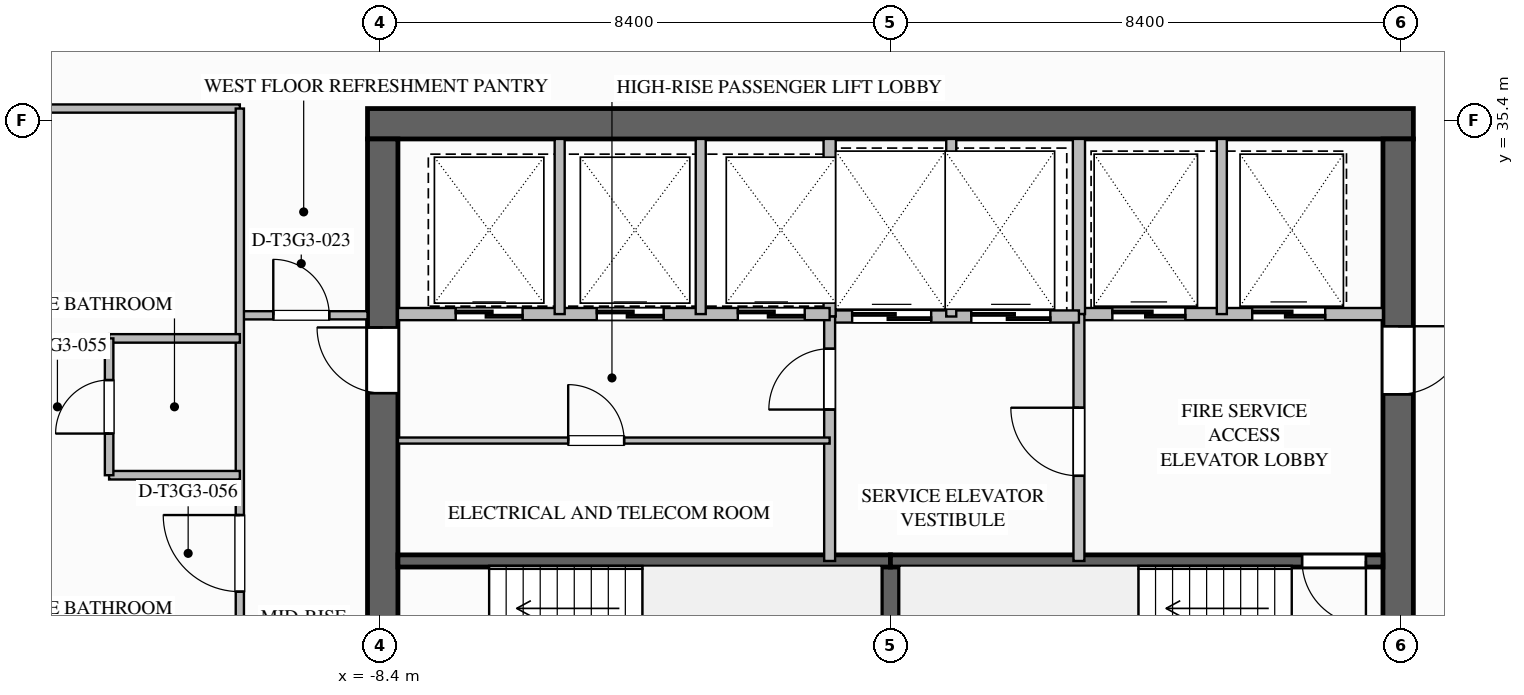
"""IFC4 building model, lengths in metres.
Left out: names, types, materials, properties, quantities, classifications, styles, units other than length and angle.
Written with IfcOpenShell. Run it as: python <this file> out.ifc"""

import sys

from ifc_helpers import new_model, si_unit, direction, frame, frame_2d, origin, place, context, subcontext, project, spatial, rectangle, extrude, element, fill, save


model = new_model("IFC4")
c1 = context("Model", 3, precision=1e-05, world=origin(), true_north=direction((0.0, 1.0)))
c2 = subcontext(c1, "Body", "Model", "MODEL_VIEW")
j1 = project(units=[si_unit("LENGTHUNIT", "METRE"), si_unit("PLANEANGLEUNIT", "RADIAN")], contexts=[c1])
p1 = place(None, origin())
s1 = spatial("IfcSite", under=j1, at=p1, CompositionType="ELEMENT")
p2 = place(p1, origin())
s2 = spatial("IfcBuilding", under=s1, at=p2, CompositionType="ELEMENT")
p3 = place(p2, frame((0.0, 0.0, 171.7)))
s3 = spatial("IfcBuildingStorey", under=s2, at=p3, CompositionType="ELEMENT", Elevation=171.7)
p4 = place(p3, frame((-8.6, 35.35, 0.0), z_axis=(0.0, 0.0, 1.0), x_axis=(1.0, 0.0, 0.0)))
e1 = element("IfcWall", 1, at=p4, inside=s3, PredefinedType="SHEAR", context=c2, shape_type="SweptSolid", body=[
    extrude(rectangle(XDim=17.2, YDim=0.5, at=frame_2d((8.6, 0.0))), origin(), (0.0, 0.0, 1.0), 3.55),
])
p5 = place(p3, frame((8.35, 35.1, 0.0), z_axis=(0.0, 0.0, 1.0), x_axis=(0.0, -1.0, 0.0)))
e2 = element("IfcWall", 2, at=p5, inside=s3, PredefinedType="SHEAR", context=c2, shape_type="SweptSolid", body=[
    extrude(rectangle(XDim=16.2, YDim=0.5, at=frame_2d((8.1, 0.0))), origin(), (0.0, 0.0, 1.0), 3.55),
])
p6 = place(p5, frame((3.08, 0.0, 0.0)))
e3 = element("IfcOpeningElement", 3, at=p6, cuts=e2, PredefinedType="OPENING", context=c2, shape_type="SweptSolid", body=[
    extrude(rectangle(XDim=1.12, YDim=2.1, at=frame_2d((0.56, 1.05))), frame((0.0, 0.26, 0.0), z_axis=(0.0, -1.0, 0.0), x_axis=(1.0, 0.0, 0.0)), (0.0, 0.0, 1.0), 0.52),
])
p7 = place(p5, frame((10.62, 0.0, 0.0)))
e4 = element("IfcOpeningElement", 4, at=p7, cuts=e2, PredefinedType="OPENING", context=c2, shape_type="SweptSolid", body=[
    extrude(rectangle(XDim=1.08, YDim=2.04, at=frame_2d((0.54, 1.02))), frame((0.0, 0.26, 0.0), z_axis=(0.0, -1.0, 0.0), x_axis=(1.0, 0.0, 0.0)), (0.0, 0.0, 1.0), 0.52),
])
p8 = place(p3, frame((-8.35, 18.9, 0.0), z_axis=(0.0, 0.0, 1.0), x_axis=(0.0, 1.0, 0.0)))
e5 = element("IfcWall", 5, at=p8, inside=s3, PredefinedType="SHEAR", context=c2, shape_type="SweptSolid", body=[
    extrude(rectangle(XDim=16.2, YDim=0.5, at=frame_2d((8.1, 0.0))), origin(), (0.0, 0.0, 1.0), 3.55),
])
p9 = place(p8, frame((12.02, 0.0, 0.0)))
e6 = element("IfcOpeningElement", 6, at=p9, cuts=e5, PredefinedType="OPENING", context=c2, shape_type="SweptSolid", body=[
    extrude(rectangle(XDim=1.08, YDim=2.04, at=frame_2d((0.54, 1.02))), frame((0.0, 0.26, 0.0), z_axis=(0.0, -1.0, 0.0), x_axis=(1.0, 0.0, 0.0)), (0.0, 0.0, 1.0), 0.52),
])
p10 = place(p8, frame((4.5, 0.0, 0.0)))
e7 = element("IfcOpeningElement", 7, at=p10, cuts=e5, PredefinedType="OPENING", context=c2, shape_type="SweptSolid", body=[
    extrude(rectangle(XDim=1.08, YDim=2.04, at=frame_2d((0.54, 1.02))), frame((0.0, 0.26, 0.0), z_axis=(0.0, -1.0, 0.0), x_axis=(1.0, 0.0, 0.0)), (0.0, 0.0, 1.0), 0.52),
])
p11 = place(p3, frame((0.0, 25.04, 0.0), z_axis=(0.0, 0.0, 1.0), x_axis=(0.0, 1.0, 0.0)))
e8 = element("IfcWall", 8, at=p11, inside=s3, PredefinedType="SOLIDWALL", context=c2, shape_type="SweptSolid", body=[
    extrude(rectangle(XDim=3.12, YDim=0.3, at=frame_2d((1.56, 0.0))), origin(), (0.0, 0.0, 1.0), 3.29),
])
p12 = place(p3, frame((-8.1, 28.16, 0.0), z_axis=(0.0, 0.0, 1.0), x_axis=(1.0, 0.0, 0.0)))
e9 = element("IfcWall", 9, at=p12, inside=s3, PredefinedType="SOLIDWALL", context=c2, shape_type="SweptSolid", body=[
    extrude(rectangle(XDim=8.1, YDim=0.2, at=frame_2d((4.05, 0.0))), origin(), (0.0, 0.0, 1.0), 3.29),
])
p13 = place(p3, frame((8.1, 28.16, 0.0), z_axis=(0.0, 0.0, 1.0), x_axis=(-1.0, 0.0, 0.0)))
e10 = element("IfcWall", 10, at=p13, inside=s3, PredefinedType="SOLIDWALL", context=c2, shape_type="SweptSolid", body=[
    extrude(rectangle(XDim=8.1, YDim=0.2, at=frame_2d((4.05, 0.0))), origin(), (0.0, 0.0, 1.0), 3.29),
])
p14 = place(p13, frame((0.28, 0.0, 0.0)))
e11 = element("IfcOpeningElement", 11, at=p14, cuts=e10, PredefinedType="OPENING", context=c2, shape_type="SweptSolid", body=[
    extrude(rectangle(XDim=1.05, YDim=2.1, at=frame_2d((0.525, 1.05))), frame((0.0, 0.11, 0.0), z_axis=(0.0, -1.0, 0.0), x_axis=(1.0, 0.0, 0.0)), (0.0, 0.0, 1.0), 0.22),
])
p15 = place(p3, frame((3.1, 32.22, 0.0), z_axis=(0.0, 0.0, 1.0), x_axis=(1.0, 0.0, 0.0)))
e12 = element("IfcWall", 12, at=p15, inside=s3, PredefinedType="SOLIDWALL", context=c2, shape_type="SweptSolid", body=[
    extrude(rectangle(XDim=5.0, YDim=0.2, at=frame_2d((2.5, 0.0))), origin(), (0.0, 0.0, 1.0), 3.29),
])
p16 = place(p15, frame((0.55, 0.0, 0.0)))
e13 = element("IfcOpeningElement", 13, at=p16, cuts=e12, PredefinedType="OPENING", context=c2, shape_type="SweptSolid", body=[
    extrude(rectangle(XDim=1.2, YDim=2.2, at=frame_2d((0.6, 1.1))), frame((0.0, 0.11, 0.0), z_axis=(0.0, -1.0, 0.0), x_axis=(1.0, 0.0, 0.0)), (0.0, 0.0, 1.0), 0.22),
])
p17 = place(p15, frame((2.85, 0.0, 0.0)))
e14 = element("IfcOpeningElement", 14, at=p17, cuts=e12, PredefinedType="OPENING", context=c2, shape_type="SweptSolid", body=[
    extrude(rectangle(XDim=1.2, YDim=2.2, at=frame_2d((0.6, 1.1))), frame((0.0, 0.11, 0.0), z_axis=(0.0, -1.0, 0.0), x_axis=(1.0, 0.0, 0.0)), (0.0, 0.0, 1.0), 0.22),
])
p18 = place(p3, frame((3.1, 32.22, 0.0), z_axis=(0.0, 0.0, 1.0), x_axis=(0.0, 1.0, 0.0)))
e15 = element("IfcWall", 15, at=p18, inside=s3, PredefinedType="SOLIDWALL", context=c2, shape_type="SweptSolid", body=[
    extrude(rectangle(XDim=2.88, YDim=0.2, at=frame_2d((1.44, 0.0))), origin(), (0.0, 0.0, 1.0), 3.29),
])
p19 = place(p3, frame((5.45, 32.22, 0.0), z_axis=(0.0, 0.0, 1.0), x_axis=(0.0, 1.0, 0.0)))
e16 = element("IfcWall", 16, at=p19, inside=s3, PredefinedType="PARTITIONING", context=c2, shape_type="SweptSolid", body=[
    extrude(rectangle(XDim=2.88, YDim=0.165, at=frame_2d((1.44, 0.0))), origin(), (0.0, 0.0, 1.0), 3.29),
])
p20 = place(p3, frame((3.1, 28.16, 0.0), z_axis=(0.0, 0.0, 1.0), x_axis=(0.0, 1.0, 0.0)))
e17 = element("IfcWall", 17, at=p20, inside=s3, PredefinedType="SOLIDWALL", context=c2, shape_type="SweptSolid", body=[
    extrude(rectangle(XDim=4.06, YDim=0.18, at=frame_2d((2.03, 0.0))), origin(), (0.0, 0.0, 1.0), 3.29),
])
p21 = place(p20, frame((1.4, 0.0, 0.0)))
e18 = element("IfcOpeningElement", 18, at=p21, cuts=e17, PredefinedType="OPENING", context=c2, shape_type="SweptSolid", body=[
    extrude(rectangle(XDim=1.12, YDim=2.1, at=frame_2d((0.56, 1.05))), frame((0.0, 0.1, 0.0), z_axis=(0.0, -1.0, 0.0), x_axis=(1.0, 0.0, 0.0)), (0.0, 0.0, 1.0), 0.2),
])
p22 = place(p3, frame((-1.0, 32.18, 0.0), z_axis=(0.0, 0.0, 1.0), x_axis=(1.0, 0.0, 0.0)))
e19 = element("IfcWall", 19, at=p22, inside=s3, PredefinedType="SOLIDWALL", context=c2, shape_type="SweptSolid", body=[
    extrude(rectangle(XDim=4.1, YDim=0.2, at=frame_2d((2.05, 0.0))), origin(), (0.0, 0.0, 1.0), 3.29),
])
p23 = place(p22, frame((0.37, 0.0, 0.0)))
e20 = element("IfcOpeningElement", 20, at=p23, cuts=e19, PredefinedType="OPENING", context=c2, shape_type="SweptSolid", body=[
    extrude(rectangle(XDim=1.3, YDim=2.2, at=frame_2d((0.65, 1.1))), frame((0.0, 0.11, 0.0), z_axis=(0.0, -1.0, 0.0), x_axis=(1.0, 0.0, 0.0)), (0.0, 0.0, 1.0), 0.22),
])
p24 = place(p22, frame((2.33, 0.0, 0.0)))
e21 = element("IfcOpeningElement", 21, at=p24, cuts=e19, PredefinedType="OPENING", context=c2, shape_type="SweptSolid", body=[
    extrude(rectangle(XDim=1.3, YDim=2.2, at=frame_2d((0.65, 1.1))), frame((0.0, 0.11, 0.0), z_axis=(0.0, -1.0, 0.0), x_axis=(1.0, 0.0, 0.0)), (0.0, 0.0, 1.0), 0.22),
])
p25 = place(p3, frame((-1.0, 32.18, 0.0), z_axis=(0.0, 0.0, 1.0), x_axis=(0.0, 1.0, 0.0)))
e22 = element("IfcWall", 22, at=p25, inside=s3, PredefinedType="SOLIDWALL", context=c2, shape_type="SweptSolid", body=[
    extrude(rectangle(XDim=2.92, YDim=0.2, at=frame_2d((1.46, 0.0))), origin(), (0.0, 0.0, 1.0), 3.29),
])
p26 = place(p3, frame((1.0, 32.18, 0.0), z_axis=(0.0, 0.0, 1.0), x_axis=(0.0, 1.0, 0.0)))
e23 = element("IfcWall", 23, at=p26, inside=s3, PredefinedType="PARTITIONING", context=c2, shape_type="SweptSolid", body=[
    extrude(rectangle(XDim=2.92, YDim=0.165, at=frame_2d((1.46, 0.0))), origin(), (0.0, 0.0, 1.0), 3.29),
])
p27 = place(p3, frame((-1.0, 28.16, 0.0), z_axis=(0.0, 0.0, 1.0), x_axis=(0.0, 1.0, 0.0)))
e24 = element("IfcWall", 24, at=p27, inside=s3, PredefinedType="SOLIDWALL", context=c2, shape_type="SweptSolid", body=[
    extrude(rectangle(XDim=4.02, YDim=0.18, at=frame_2d((2.01, 0.0))), origin(), (0.0, 0.0, 1.0), 3.29),
])
p28 = place(p27, frame((2.49, 0.0, 0.0)))
e25 = element("IfcOpeningElement", 25, at=p28, cuts=e24, PredefinedType="OPENING", context=c2, shape_type="SweptSolid", body=[
    extrude(rectangle(XDim=1.0, YDim=2.1, at=frame_2d((0.5, 1.05))), frame((0.0, 0.1, 0.0), z_axis=(0.0, -1.0, 0.0), x_axis=(1.0, 0.0, 0.0)), (0.0, 0.0, 1.0), 0.2),
])
p29 = place(p3, frame((-8.1, 32.22, 0.0), z_axis=(0.0, 0.0, 1.0), x_axis=(1.0, 0.0, 0.0)))
e26 = element("IfcWall", 26, at=p29, inside=s3, PredefinedType="SOLIDWALL", context=c2, shape_type="SweptSolid", body=[
    extrude(rectangle(XDim=7.1, YDim=0.2, at=frame_2d((3.55, 0.0))), origin(), (0.0, 0.0, 1.0), 3.29),
])
p30 = place(p29, frame((0.95, 0.0, 0.0)))
e27 = element("IfcOpeningElement", 27, at=p30, cuts=e26, PredefinedType="OPENING", context=c2, shape_type="SweptSolid", body=[
    extrude(rectangle(XDim=1.1, YDim=2.2, at=frame_2d((0.55, 1.1))), frame((0.0, 0.11, 0.0), z_axis=(0.0, -1.0, 0.0), x_axis=(1.0, 0.0, 0.0)), (0.0, 0.0, 1.0), 0.22),
])
p31 = place(p29, frame((3.27, 0.0, 0.0)))
e28 = element("IfcOpeningElement", 28, at=p31, cuts=e26, PredefinedType="OPENING", context=c2, shape_type="SweptSolid", body=[
    extrude(rectangle(XDim=1.1, YDim=2.2, at=frame_2d((0.55, 1.1))), frame((0.0, 0.11, 0.0), z_axis=(0.0, -1.0, 0.0), x_axis=(1.0, 0.0, 0.0)), (0.0, 0.0, 1.0), 0.22),
])
p32 = place(p29, frame((5.59, 0.0, 0.0)))
e29 = element("IfcOpeningElement", 29, at=p32, cuts=e26, PredefinedType="OPENING", context=c2, shape_type="SweptSolid", body=[
    extrude(rectangle(XDim=1.1, YDim=2.2, at=frame_2d((0.55, 1.1))), frame((0.0, 0.11, 0.0), z_axis=(0.0, -1.0, 0.0), x_axis=(1.0, 0.0, 0.0)), (0.0, 0.0, 1.0), 0.22),
])
for number, where, z_axis, x_axis in (
    (30, (-5.44, 32.22, 0.0), (0.0, 0.0, 1.0), (0.0, 1.0, 0.0)),
    (31, (-3.12, 32.22, 0.0), (0.0, 0.0, 1.0), (0.0, 1.0, 0.0)),
):
    element("IfcWall", number, at=place(p3, frame(where, z_axis=z_axis, x_axis=x_axis)), inside=s3, PredefinedType="PARTITIONING", context=c2, shape_type="SweptSolid", body=[
        extrude(rectangle(XDim=2.88, YDim=0.165, at=frame_2d((1.44, 0.0))), origin(), (0.0, 0.0, 1.0), 3.29),
    ])
p33 = place(p3, frame((-8.1, 30.14, 0.0), z_axis=(0.0, 0.0, 1.0), x_axis=(1.0, 0.0, 0.0)))
e32 = element("IfcWall", 32, at=p33, inside=s3, PredefinedType="PARTITIONING", context=c2, shape_type="SweptSolid", body=[
    extrude(rectangle(XDim=7.1, YDim=0.1, at=frame_2d((3.55, 0.0))), origin(), (0.0, 0.0, 1.0), 3.29),
])
p34 = place(p33, frame((2.8, 0.0, 0.0)))
e33 = element("IfcOpeningElement", 33, at=p34, cuts=e32, PredefinedType="OPENING", context=c2, shape_type="SweptSolid", body=[
    extrude(rectangle(XDim=0.92, YDim=2.1, at=frame_2d((0.46, 1.05))), frame((0.0, 0.06, 0.0), z_axis=(0.0, -1.0, 0.0), x_axis=(1.0, 0.0, 0.0)), (0.0, 0.0, 1.0), 0.12),
])
p35 = place(p3, frame((-10.7, 32.2, 0.0), z_axis=(0.0, 0.0, 1.0), x_axis=(1.0, 0.0, 0.0)))
e34 = element("IfcWall", 34, at=p35, inside=s3, PredefinedType="PARTITIONING", context=c2, shape_type="SweptSolid", body=[
    extrude(rectangle(XDim=2.1, YDim=0.135, at=frame_2d((1.05, 0.0))), origin(), (0.0, 0.0, 1.0), 3.29),
])
p36 = place(p35, frame((0.55, 0.0, 0.0)))
e35 = element("IfcOpeningElement", 35, at=p36, cuts=e34, PredefinedType="OPENING", context=c2, shape_type="SweptSolid", body=[
    extrude(rectangle(XDim=0.92, YDim=2.1, at=frame_2d((0.46, 1.05))), frame((0.0, 0.077, 0.0), z_axis=(0.0, -1.0, 0.0), x_axis=(1.0, 0.0, 0.0)), (0.0, 0.0, 1.0), 0.155),
])
p37 = place(p3, frame((-16.2, 35.6, 0.0), z_axis=(0.0, 0.0, 1.0), x_axis=(1.0, 0.0, 0.0)))
e36 = element("IfcWall", 36, at=p37, inside=s3, PredefinedType="PARTITIONING", context=c2, shape_type="SweptSolid", body=[
    extrude(rectangle(XDim=5.5, YDim=0.135, at=frame_2d((2.75, 0.0))), origin(), (0.0, 0.0, 1.0), 2.667),
])
p38 = place(p3, frame((-10.7, 18.4, 0.0), z_axis=(0.0, 0.0, 1.0), x_axis=(0.0, 1.0, 0.0)))
e37 = element("IfcWall", 37, at=p38, inside=s3, PredefinedType="PARTITIONING", context=c2, shape_type="SweptSolid", body=[
    extrude(rectangle(XDim=17.2, YDim=0.135, at=frame_2d((8.6, 0.0))), origin(), (0.0, 0.0, 1.0), 3.29),
])
p39 = place(p38, frame((4.255, 0.0, 0.0)))
e38 = element("IfcOpeningElement", 38, at=p39, cuts=e37, PredefinedType="OPENING", context=c2, shape_type="SweptSolid", body=[
    extrude(rectangle(XDim=1.26, YDim=2.2, at=frame_2d((0.63, 1.1))), frame((0.0, 0.077, 0.0), z_axis=(0.0, -1.0, 0.0), x_axis=(1.0, 0.0, 0.0)), (0.0, 0.0, 1.0), 0.155),
])
p40 = place(p38, frame((9.255, 0.0, 0.0)))
e39 = element("IfcOpeningElement", 39, at=p40, cuts=e37, PredefinedType="OPENING", context=c2, shape_type="SweptSolid", body=[
    extrude(rectangle(XDim=1.26, YDim=2.2, at=frame_2d((0.63, 1.1))), frame((0.0, 0.077, 0.0), z_axis=(0.0, -1.0, 0.0), x_axis=(1.0, 0.0, 0.0)), (0.0, 0.0, 1.0), 0.155),
])
for number, where, z_axis, x_axis in (
    (40, (-10.7, 29.57, 0.0), (0.0, 0.0, 1.0), (-1.0, 0.0, 0.0)),
    (41, (-10.7, 31.82, 0.0), (0.0, 0.0, 1.0), (-1.0, 0.0, 0.0)),
):
    element("IfcWall", number, at=place(p3, frame(where, z_axis=z_axis, x_axis=x_axis)), inside=s3, PredefinedType="PLUMBINGWALL", context=c2, shape_type="SweptSolid", body=[
        extrude(rectangle(XDim=2.15, YDim=0.14, at=frame_2d((1.075, 0.0))), origin(), (0.0, 0.0, 1.0), 3.29),
    ])
p41 = place(p3, frame((-12.85, 29.57, 0.0), z_axis=(0.0, 0.0, 1.0), x_axis=(0.0, 1.0, 0.0)))
e42 = element("IfcWall", 42, at=p41, inside=s3, PredefinedType="PLUMBINGWALL", context=c2, shape_type="SweptSolid", body=[
    extrude(rectangle(XDim=2.25, YDim=0.14, at=frame_2d((1.125, 0.0))), origin(), (0.0, 0.0, 1.0), 3.29),
])
p42 = place(p41, frame((0.685, 0.0, 0.0)))
e43 = element("IfcOpeningElement", 43, at=p42, cuts=e42, PredefinedType="OPENING", context=c2, shape_type="SweptSolid", body=[
    extrude(rectangle(XDim=0.88, YDim=2.1, at=frame_2d((0.44, 1.05))), frame((0.0, 0.08, 0.0), z_axis=(0.0, -1.0, 0.0), x_axis=(1.0, 0.0, 0.0)), (0.0, 0.0, 1.0), 0.16),
])
p43 = place(p14, origin())
e44 = element("IfcDoor", 44, at=p43, inside=s3, OperationType="SINGLE_SWING_LEFT", PredefinedType="DOOR", context=c2, shape_type="SweptSolid", body=[
    extrude(rectangle(XDim=1.05, YDim=2.1, at=frame_2d((0.525, 1.05))), frame((0.0, 0.025, 0.0), z_axis=(0.0, -1.0, 0.0), x_axis=(1.0, 0.0, 0.0)), (0.0, 0.0, 1.0), 0.05),
])
fill(e11, e44)
p44 = place(p16, origin())
e45 = element("IfcDoor", 45, at=p44, inside=s3, OperationType="SLIDING_TO_LEFT", PredefinedType="DOOR", context=c2, shape_type="SweptSolid", body=[
    extrude(rectangle(XDim=1.2, YDim=2.2, at=frame_2d((0.6, 1.1))), frame((0.0, 0.025, 0.0), z_axis=(0.0, -1.0, 0.0), x_axis=(1.0, 0.0, 0.0)), (0.0, 0.0, 1.0), 0.05),
])
fill(e13, e45)
p45 = place(p17, origin())
e46 = element("IfcDoor", 46, at=p45, inside=s3, OperationType="SLIDING_TO_LEFT", PredefinedType="DOOR", context=c2, shape_type="SweptSolid", body=[
    extrude(rectangle(XDim=1.2, YDim=2.2, at=frame_2d((0.6, 1.1))), frame((0.0, 0.025, 0.0), z_axis=(0.0, -1.0, 0.0), x_axis=(1.0, 0.0, 0.0)), (0.0, 0.0, 1.0), 0.05),
])
fill(e14, e46)
p46 = place(p21, origin())
e47 = element("IfcDoor", 47, at=p46, inside=s3, OperationType="SINGLE_SWING_RIGHT", PredefinedType="DOOR", context=c2, shape_type="SweptSolid", body=[
    extrude(rectangle(XDim=1.12, YDim=2.1, at=frame_2d((0.56, 1.05))), frame((0.0, 0.025, 0.0), z_axis=(0.0, -1.0, 0.0), x_axis=(1.0, 0.0, 0.0)), (0.0, 0.0, 1.0), 0.05),
])
fill(e18, e47)
p47 = place(p6, origin())
e48 = element("IfcDoor", 48, at=p47, inside=s3, OperationType="SINGLE_SWING_LEFT", PredefinedType="DOOR", context=c2, shape_type="SweptSolid", body=[
    extrude(rectangle(XDim=1.12, YDim=2.1, at=frame_2d((0.56, 1.05))), frame((0.0, 0.025, 0.0), z_axis=(0.0, -1.0, 0.0), x_axis=(1.0, 0.0, 0.0)), (0.0, 0.0, 1.0), 0.05),
])
fill(e3, e48)
p48 = place(p23, origin())
e49 = element("IfcDoor", 49, at=p48, inside=s3, OperationType="SLIDING_TO_LEFT", PredefinedType="DOOR", context=c2, shape_type="SweptSolid", body=[
    extrude(rectangle(XDim=1.3, YDim=2.2, at=frame_2d((0.65, 1.1))), frame((0.0, 0.025, 0.0), z_axis=(0.0, -1.0, 0.0), x_axis=(1.0, 0.0, 0.0)), (0.0, 0.0, 1.0), 0.05),
])
fill(e20, e49)
p49 = place(p24, origin())
e50 = element("IfcDoor", 50, at=p49, inside=s3, OperationType="SLIDING_TO_LEFT", PredefinedType="DOOR", context=c2, shape_type="SweptSolid", body=[
    extrude(rectangle(XDim=1.3, YDim=2.2, at=frame_2d((0.65, 1.1))), frame((0.0, 0.025, 0.0), z_axis=(0.0, -1.0, 0.0), x_axis=(1.0, 0.0, 0.0)), (0.0, 0.0, 1.0), 0.05),
])
fill(e21, e50)
p50 = place(p28, origin())
e51 = element("IfcDoor", 51, at=p50, inside=s3, OperationType="SINGLE_SWING_LEFT", PredefinedType="DOOR", context=c2, shape_type="SweptSolid", body=[
    extrude(rectangle(XDim=1.0, YDim=2.1, at=frame_2d((0.5, 1.05))), frame((0.0, 0.025, 0.0), z_axis=(0.0, -1.0, 0.0), x_axis=(1.0, 0.0, 0.0)), (0.0, 0.0, 1.0), 0.05),
])
fill(e25, e51)
p51 = place(p30, origin())
e52 = element("IfcDoor", 52, at=p51, inside=s3, OperationType="SLIDING_TO_LEFT", PredefinedType="DOOR", context=c2, shape_type="SweptSolid", body=[
    extrude(rectangle(XDim=1.1, YDim=2.2, at=frame_2d((0.55, 1.1))), frame((0.0, 0.025, 0.0), z_axis=(0.0, -1.0, 0.0), x_axis=(1.0, 0.0, 0.0)), (0.0, 0.0, 1.0), 0.05),
])
fill(e27, e52)
p52 = place(p31, origin())
e53 = element("IfcDoor", 53, at=p52, inside=s3, OperationType="SLIDING_TO_LEFT", PredefinedType="DOOR", context=c2, shape_type="SweptSolid", body=[
    extrude(rectangle(XDim=1.1, YDim=2.2, at=frame_2d((0.55, 1.1))), frame((0.0, 0.025, 0.0), z_axis=(0.0, -1.0, 0.0), x_axis=(1.0, 0.0, 0.0)), (0.0, 0.0, 1.0), 0.05),
])
fill(e28, e53)
p53 = place(p32, origin())
e54 = element("IfcDoor", 54, at=p53, inside=s3, OperationType="SLIDING_TO_LEFT", PredefinedType="DOOR", context=c2, shape_type="SweptSolid", body=[
    extrude(rectangle(XDim=1.1, YDim=2.2, at=frame_2d((0.55, 1.1))), frame((0.0, 0.025, 0.0), z_axis=(0.0, -1.0, 0.0), x_axis=(1.0, 0.0, 0.0)), (0.0, 0.0, 1.0), 0.05),
])
fill(e29, e54)
p54 = place(p9, origin())
e55 = element("IfcDoor", 55, at=p54, inside=s3, OperationType="SINGLE_SWING_RIGHT", PredefinedType="DOOR", context=c2, shape_type="SweptSolid", body=[
    extrude(rectangle(XDim=1.08, YDim=2.04, at=frame_2d((0.54, 1.02))), frame((0.0, 0.025, 0.0), z_axis=(0.0, -1.0, 0.0), x_axis=(1.0, 0.0, 0.0)), (0.0, 0.0, 1.0), 0.05),
])
fill(e6, e55)
p55 = place(p34, origin())
e56 = element("IfcDoor", 56, at=p55, inside=s3, OperationType="SINGLE_SWING_LEFT", PredefinedType="DOOR", context=c2, shape_type="SweptSolid", body=[
    extrude(rectangle(XDim=0.92, YDim=2.1, at=frame_2d((0.46, 1.05))), frame((0.0, 0.025, 0.0), z_axis=(0.0, -1.0, 0.0), x_axis=(1.0, 0.0, 0.0)), (0.0, 0.0, 1.0), 0.05),
])
fill(e33, e56)
p56 = place(p36, origin())
e57 = element("IfcDoor", 57, at=p56, inside=s3, OperationType="SINGLE_SWING_LEFT", PredefinedType="DOOR", context=c2, shape_type="SweptSolid", body=[
    extrude(rectangle(XDim=0.92, YDim=2.1, at=frame_2d((0.46, 1.05))), frame((0.0, 0.025, 0.0), z_axis=(0.0, -1.0, 0.0), x_axis=(1.0, 0.0, 0.0)), (0.0, 0.0, 1.0), 0.05),
])
fill(e35, e57)
p57 = place(p42, origin())
e58 = element("IfcDoor", 58, at=p57, inside=s3, OperationType="SINGLE_SWING_LEFT", PredefinedType="DOOR", context=c2, shape_type="SweptSolid", body=[
    extrude(rectangle(XDim=0.88, YDim=2.1, at=frame_2d((0.44, 1.05))), frame((0.0, 0.025, 0.0), z_axis=(0.0, -1.0, 0.0), x_axis=(1.0, 0.0, 0.0)), (0.0, 0.0, 1.0), 0.05),
])
fill(e43, e58)
p58 = place(p40, origin())
e59 = element("IfcDoor", 59, at=p58, inside=s3, OperationType="SINGLE_SWING_RIGHT", PredefinedType="DOOR", context=c2, shape_type="SweptSolid", body=[
    extrude(rectangle(XDim=1.26, YDim=2.2, at=frame_2d((0.63, 1.1))), frame((0.0, 0.025, 0.0), z_axis=(0.0, -1.0, 0.0), x_axis=(1.0, 0.0, 0.0)), (0.0, 0.0, 1.0), 0.05),
])
fill(e39, e59)
save(model, sys.argv[1])
